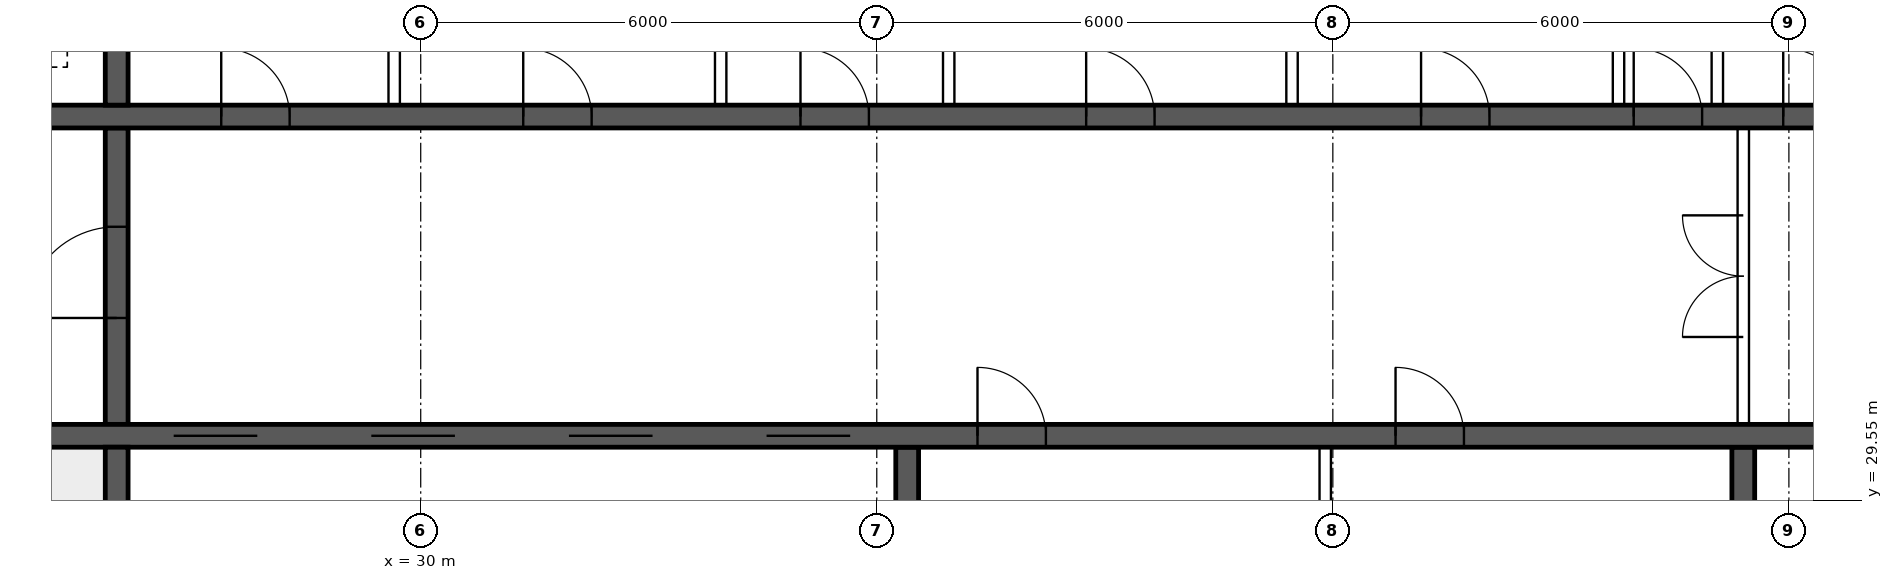
"""IFC4 building model, lengths in metres.
Left out: names, types, materials, properties, quantities, classifications, styles, units other than length and angle.
Written with IfcOpenShell. Run it as: python <this file> out.ifc"""

import sys

from ifc_helpers import new_model, si_unit, direction, frame, frame_2d, origin, place, context, subcontext, project, spatial, rectangle, extrude, element, fill, save


model = new_model("IFC4")
c1 = context("Model", 3, precision=1e-05, world=origin(), true_north=direction((0.0, 1.0)))
c2 = subcontext(c1, "Body", "Model", "MODEL_VIEW")
j1 = project(units=[si_unit("LENGTHUNIT", "METRE"), si_unit("PLANEANGLEUNIT", "RADIAN")], contexts=[c1])
p1 = place(None, origin())
s1 = spatial("IfcSite", under=j1, at=p1, CompositionType="ELEMENT")
p2 = place(p1, origin())
s2 = spatial("IfcBuilding", under=s1, at=p2, CompositionType="ELEMENT")
p3 = place(p2, frame((0.0, 0.0, 220.3)))
s3 = spatial("IfcBuildingStorey", under=s2, at=p3, CompositionType="ELEMENT", Elevation=220.3)
p4 = place(p3, frame((18.35, 30.4, 0.0), z_axis=(0.0, 0.0, 1.0), x_axis=(1.0, 0.0, 0.0)))
e1 = element("IfcWall", 1, at=p4, inside=s3, PredefinedType="SHEAR", context=c2, shape_type="SweptSolid", body=[
    extrude(rectangle(XDim=47.3, YDim=0.3, at=frame_2d((23.65, 0.0))), origin(), (0.0, 0.0, 1.0), 3.75),
])
p5 = place(p4, frame((0.4, 0.0, 0.0)))
e2 = element("IfcOpeningElement", 2, at=p5, cuts=e1, PredefinedType="OPENING", context=c2, shape_type="SweptSolid", body=[
    extrude(rectangle(XDim=1.0, YDim=2.1, at=frame_2d((0.5, 1.05))), frame((0.0, 0.16, 0.0), z_axis=(0.0, -1.0, 0.0), x_axis=(1.0, 0.0, 0.0)), (0.0, 0.0, 1.0), 0.32),
])
p6 = place(p4, frame((45.9, 0.0, 0.0)))
e3 = element("IfcOpeningElement", 3, at=p6, cuts=e1, PredefinedType="OPENING", context=c2, shape_type="SweptSolid", body=[
    extrude(rectangle(XDim=1.0, YDim=2.1, at=frame_2d((0.5, 1.05))), frame((0.0, 0.16, 0.0), z_axis=(0.0, -1.0, 0.0), x_axis=(1.0, 0.0, 0.0)), (0.0, 0.0, 1.0), 0.32),
])
p7 = place(p4, frame((8.4, 0.0, 0.0)))
e4 = element("IfcOpeningElement", 4, at=p7, cuts=e1, PredefinedType="OPENING", context=c2, shape_type="SweptSolid", body=[
    extrude(rectangle(XDim=1.1, YDim=2.1, at=frame_2d((0.55, 1.05))), frame((0.0, 0.16, 0.0), z_axis=(0.0, -1.0, 0.0), x_axis=(1.0, 0.0, 0.0)), (0.0, 0.0, 1.0), 0.32),
])
p8 = place(p4, frame((11.0, 0.0, 0.0)))
e5 = element("IfcOpeningElement", 5, at=p8, cuts=e1, PredefinedType="OPENING", context=c2, shape_type="SweptSolid", body=[
    extrude(rectangle(XDim=1.1, YDim=2.1, at=frame_2d((0.55, 1.05))), frame((0.0, 0.16, 0.0), z_axis=(0.0, -1.0, 0.0), x_axis=(1.0, 0.0, 0.0)), (0.0, 0.0, 1.0), 0.32),
])
p9 = place(p4, frame((13.6, 0.0, 0.0)))
e6 = element("IfcOpeningElement", 6, at=p9, cuts=e1, PredefinedType="OPENING", context=c2, shape_type="SweptSolid", body=[
    extrude(rectangle(XDim=1.1, YDim=2.1, at=frame_2d((0.55, 1.05))), frame((0.0, 0.16, 0.0), z_axis=(0.0, -1.0, 0.0), x_axis=(1.0, 0.0, 0.0)), (0.0, 0.0, 1.0), 0.32),
])
p10 = place(p4, frame((16.2, 0.0, 0.0)))
e7 = element("IfcOpeningElement", 7, at=p10, cuts=e1, PredefinedType="OPENING", context=c2, shape_type="SweptSolid", body=[
    extrude(rectangle(XDim=1.1, YDim=2.1, at=frame_2d((0.55, 1.05))), frame((0.0, 0.16, 0.0), z_axis=(0.0, -1.0, 0.0), x_axis=(1.0, 0.0, 0.0)), (0.0, 0.0, 1.0), 0.32),
])
p11 = place(p4, frame((18.975, 0.0, 0.0)))
e8 = element("IfcOpeningElement", 8, at=p11, cuts=e1, PredefinedType="OPENING", context=c2, shape_type="SweptSolid", body=[
    extrude(rectangle(XDim=0.9, YDim=2.1, at=frame_2d((0.45, 1.05))), frame((0.0, 0.16, 0.0), z_axis=(0.0, -1.0, 0.0), x_axis=(1.0, 0.0, 0.0)), (0.0, 0.0, 1.0), 0.32),
])
p12 = place(p4, frame((24.475, 0.0, 0.0)))
e9 = element("IfcOpeningElement", 9, at=p12, cuts=e1, PredefinedType="OPENING", context=c2, shape_type="SweptSolid", body=[
    extrude(rectangle(XDim=0.9, YDim=2.1, at=frame_2d((0.45, 1.05))), frame((0.0, 0.16, 0.0), z_axis=(0.0, -1.0, 0.0), x_axis=(1.0, 0.0, 0.0)), (0.0, 0.0, 1.0), 0.32),
])
p13 = place(p4, frame((30.267, 0.0, 0.0)))
e10 = element("IfcOpeningElement", 10, at=p13, cuts=e1, PredefinedType="OPENING", context=c2, shape_type="SweptSolid", body=[
    extrude(rectangle(XDim=1.1, YDim=2.1, at=frame_2d((0.55, 1.05))), frame((0.0, 0.16, 0.0), z_axis=(0.0, -1.0, 0.0), x_axis=(1.0, 0.0, 0.0)), (0.0, 0.0, 1.0), 0.32),
])
p14 = place(p4, frame((33.8, 0.0, 0.0)))
e11 = element("IfcOpeningElement", 11, at=p14, cuts=e1, PredefinedType="OPENING", context=c2, shape_type="SweptSolid", body=[
    extrude(rectangle(XDim=1.1, YDim=2.1, at=frame_2d((0.55, 1.05))), frame((0.0, 0.16, 0.0), z_axis=(0.0, -1.0, 0.0), x_axis=(1.0, 0.0, 0.0)), (0.0, 0.0, 1.0), 0.32),
])
p15 = place(p4, frame((37.333, 0.0, 0.0)))
e12 = element("IfcOpeningElement", 12, at=p15, cuts=e1, PredefinedType="OPENING", context=c2, shape_type="SweptSolid", body=[
    extrude(rectangle(XDim=1.1, YDim=2.1, at=frame_2d((0.55, 1.05))), frame((0.0, 0.16, 0.0), z_axis=(0.0, -1.0, 0.0), x_axis=(1.0, 0.0, 0.0)), (0.0, 0.0, 1.0), 0.32),
])
p16 = place(p3, frame((18.35, 34.6, 0.0), z_axis=(0.0, 0.0, 1.0), x_axis=(1.0, 0.0, 0.0)))
e13 = element("IfcWall", 13, at=p16, inside=s3, PredefinedType="SHEAR", context=c2, shape_type="SweptSolid", body=[
    extrude(rectangle(XDim=47.3, YDim=0.3, at=frame_2d((23.65, 0.0))), origin(), (0.0, 0.0, 1.0), 3.75),
])
p17 = place(p16, frame((0.9, 0.0, 0.0)))
e14 = element("IfcOpeningElement", 14, at=p17, cuts=e13, PredefinedType="OPENING", context=c2, shape_type="SweptSolid", body=[
    extrude(rectangle(XDim=1.1, YDim=2.1, at=frame_2d((0.55, 1.05))), frame((0.0, 0.16, 0.0), z_axis=(0.0, -1.0, 0.0), x_axis=(1.0, 0.0, 0.0)), (0.0, 0.0, 1.0), 0.32),
])
p18 = place(p16, frame((45.3, 0.0, 0.0)))
e15 = element("IfcOpeningElement", 15, at=p18, cuts=e13, PredefinedType="OPENING", context=c2, shape_type="SweptSolid", body=[
    extrude(rectangle(XDim=1.1, YDim=2.1, at=frame_2d((0.55, 1.05))), frame((0.0, 0.16, 0.0), z_axis=(0.0, -1.0, 0.0), x_axis=(1.0, 0.0, 0.0)), (0.0, 0.0, 1.0), 0.32),
])
p19 = place(p16, frame((4.25, 0.0, 0.0)))
e16 = element("IfcOpeningElement", 16, at=p19, cuts=e13, PredefinedType="OPENING", context=c2, shape_type="SweptSolid", body=[
    extrude(rectangle(XDim=0.9, YDim=2.1, at=frame_2d((0.45, 1.05))), frame((0.0, 0.16, 0.0), z_axis=(0.0, -1.0, 0.0), x_axis=(1.0, 0.0, 0.0)), (0.0, 0.0, 1.0), 0.32),
])
p20 = place(p16, frame((42.15, 0.0, 0.0)))
e17 = element("IfcOpeningElement", 17, at=p20, cuts=e13, PredefinedType="OPENING", context=c2, shape_type="SweptSolid", body=[
    extrude(rectangle(XDim=0.9, YDim=2.1, at=frame_2d((0.45, 1.05))), frame((0.0, 0.16, 0.0), z_axis=(0.0, -1.0, 0.0), x_axis=(1.0, 0.0, 0.0)), (0.0, 0.0, 1.0), 0.32),
])
p21 = place(p16, frame((9.025, 0.0, 0.0)))
e18 = element("IfcOpeningElement", 18, at=p21, cuts=e13, PredefinedType="OPENING", context=c2, shape_type="SweptSolid", body=[
    extrude(rectangle(XDim=0.9, YDim=2.1, at=frame_2d((0.45, 1.05))), frame((0.0, 0.16, 0.0), z_axis=(0.0, -1.0, 0.0), x_axis=(1.0, 0.0, 0.0)), (0.0, 0.0, 1.0), 0.32),
])
p22 = place(p16, frame((12.999, 0.0, 0.0)))
e19 = element("IfcOpeningElement", 19, at=p22, cuts=e13, PredefinedType="OPENING", context=c2, shape_type="SweptSolid", body=[
    extrude(rectangle(XDim=0.9, YDim=2.1, at=frame_2d((0.45, 1.05))), frame((0.0, 0.16, 0.0), z_axis=(0.0, -1.0, 0.0), x_axis=(1.0, 0.0, 0.0)), (0.0, 0.0, 1.0), 0.32),
])
p23 = place(p16, frame((16.646, 0.0, 0.0)))
e20 = element("IfcOpeningElement", 20, at=p23, cuts=e13, PredefinedType="OPENING", context=c2, shape_type="SweptSolid", body=[
    extrude(rectangle(XDim=0.9, YDim=2.1, at=frame_2d((0.45, 1.05))), frame((0.0, 0.16, 0.0), z_axis=(0.0, -1.0, 0.0), x_axis=(1.0, 0.0, 0.0)), (0.0, 0.0, 1.0), 0.32),
])
p24 = place(p16, frame((20.405, 0.0, 0.0)))
e21 = element("IfcOpeningElement", 21, at=p24, cuts=e13, PredefinedType="OPENING", context=c2, shape_type="SweptSolid", body=[
    extrude(rectangle(XDim=0.9, YDim=2.1, at=frame_2d((0.45, 1.05))), frame((0.0, 0.16, 0.0), z_axis=(0.0, -1.0, 0.0), x_axis=(1.0, 0.0, 0.0)), (0.0, 0.0, 1.0), 0.32),
])
p25 = place(p16, frame((24.811, 0.0, 0.0)))
e22 = element("IfcOpeningElement", 22, at=p25, cuts=e13, PredefinedType="OPENING", context=c2, shape_type="SweptSolid", body=[
    extrude(rectangle(XDim=0.9, YDim=2.1, at=frame_2d((0.45, 1.05))), frame((0.0, 0.16, 0.0), z_axis=(0.0, -1.0, 0.0), x_axis=(1.0, 0.0, 0.0)), (0.0, 0.0, 1.0), 0.32),
])
p26 = place(p16, frame((27.608, 0.0, 0.0)))
e23 = element("IfcOpeningElement", 23, at=p26, cuts=e13, PredefinedType="OPENING", context=c2, shape_type="SweptSolid", body=[
    extrude(rectangle(XDim=0.9, YDim=2.1, at=frame_2d((0.45, 1.05))), frame((0.0, 0.16, 0.0), z_axis=(0.0, -1.0, 0.0), x_axis=(1.0, 0.0, 0.0)), (0.0, 0.0, 1.0), 0.32),
])
p27 = place(p16, frame((29.575, 0.0, 0.0)))
e24 = element("IfcOpeningElement", 24, at=p27, cuts=e13, PredefinedType="OPENING", context=c2, shape_type="SweptSolid", body=[
    extrude(rectangle(XDim=0.9, YDim=2.1, at=frame_2d((0.45, 1.05))), frame((0.0, 0.16, 0.0), z_axis=(0.0, -1.0, 0.0), x_axis=(1.0, 0.0, 0.0)), (0.0, 0.0, 1.0), 0.32),
])
p28 = place(p16, frame((32.007, 0.0, 0.0)))
e25 = element("IfcOpeningElement", 25, at=p28, cuts=e13, PredefinedType="OPENING", context=c2, shape_type="SweptSolid", body=[
    extrude(rectangle(XDim=0.9, YDim=2.1, at=frame_2d((0.45, 1.05))), frame((0.0, 0.16, 0.0), z_axis=(0.0, -1.0, 0.0), x_axis=(1.0, 0.0, 0.0)), (0.0, 0.0, 1.0), 0.32),
])
p29 = place(p16, frame((34.742, 0.0, 0.0)))
e26 = element("IfcOpeningElement", 26, at=p29, cuts=e13, PredefinedType="OPENING", context=c2, shape_type="SweptSolid", body=[
    extrude(rectangle(XDim=0.9, YDim=2.1, at=frame_2d((0.45, 1.05))), frame((0.0, 0.16, 0.0), z_axis=(0.0, -1.0, 0.0), x_axis=(1.0, 0.0, 0.0)), (0.0, 0.0, 1.0), 0.32),
])
p30 = place(p16, frame((37.781, 0.0, 0.0)))
e27 = element("IfcOpeningElement", 27, at=p30, cuts=e13, PredefinedType="OPENING", context=c2, shape_type="SweptSolid", body=[
    extrude(rectangle(XDim=0.9, YDim=2.1, at=frame_2d((0.45, 1.05))), frame((0.0, 0.16, 0.0), z_axis=(0.0, -1.0, 0.0), x_axis=(1.0, 0.0, 0.0)), (0.0, 0.0, 1.0), 0.32),
])
p31 = place(p3, frame((26.0, 26.15, 0.0), z_axis=(0.0, 0.0, 1.0), x_axis=(0.0, 1.0, 0.0)))
e28 = element("IfcWall", 28, at=p31, inside=s3, PredefinedType="SHEAR", context=c2, shape_type="SweptSolid", body=[
    extrude(rectangle(XDim=4.1, YDim=0.3, at=frame_2d((2.05, 0.0))), origin(), (0.0, 0.0, 1.0), 3.75),
])
p32 = place(p3, frame((26.0, 30.55, 0.0), z_axis=(0.0, 0.0, 1.0), x_axis=(0.0, 1.0, 0.0)))
e29 = element("IfcWall", 29, at=p32, inside=s3, PredefinedType="SHEAR", context=c2, shape_type="SweptSolid", body=[
    extrude(rectangle(XDim=3.9, YDim=0.3, at=frame_2d((1.95, 0.0))), origin(), (0.0, 0.0, 1.0), 3.75),
])
p33 = place(p32, frame((1.4, 0.0, 0.0)))
e30 = element("IfcOpeningElement", 30, at=p33, cuts=e29, PredefinedType="OPENING", context=c2, shape_type="SweptSolid", body=[
    extrude(rectangle(XDim=1.2, YDim=2.1, at=frame_2d((0.6, 1.05))), frame((0.0, 0.16, 0.0), z_axis=(0.0, -1.0, 0.0), x_axis=(1.0, 0.0, 0.0)), (0.0, 0.0, 1.0), 0.32),
])
p34 = place(p3, frame((26.0, 34.75, 0.0), z_axis=(0.0, 0.0, 1.0), x_axis=(0.0, 1.0, 0.0)))
e31 = element("IfcWall", 31, at=p34, inside=s3, PredefinedType="SHEAR", context=c2, shape_type="SweptSolid", body=[
    extrude(rectangle(XDim=3.1, YDim=0.3, at=frame_2d((1.55, 0.0))), origin(), (0.0, 0.0, 1.0), 3.75),
])
for number, where, z_axis, x_axis in (
    (32, (36.4, 26.15, 0.0), (0.0, 0.0, 1.0), (0.0, 1.0, 0.0)),
    (33, (47.4, 26.15, 0.0), (0.0, 0.0, 1.0), (0.0, 1.0, 0.0)),
):
    element("IfcWall", number, at=place(p3, frame(where, z_axis=z_axis, x_axis=x_axis)), inside=s3, PredefinedType="SHEAR", context=c2, shape_type="SweptSolid", body=[
        extrude(rectangle(XDim=4.1, YDim=0.3, at=frame_2d((2.05, 0.0))), origin(), (0.0, 0.0, 1.0), 3.75),
    ])
p35 = place(p3, frame((47.4, 30.55, 0.0), z_axis=(0.0, 0.0, 1.0), x_axis=(0.0, 1.0, 0.0)))
e34 = element("IfcWall", 34, at=p35, inside=s3, PredefinedType="SOLIDWALL", context=c2, shape_type="SweptSolid", body=[
    extrude(rectangle(XDim=3.9, YDim=0.15, at=frame_2d((1.95, 0.0))), origin(), (0.0, 0.0, 1.0), 3.5),
])
p36 = place(p35, frame((1.15, 0.0, 0.0)))
e35 = element("IfcOpeningElement", 35, at=p36, cuts=e34, PredefinedType="OPENING", context=c2, shape_type="SweptSolid", body=[
    extrude(rectangle(XDim=1.6, YDim=2.1, at=frame_2d((0.8, 1.05))), frame((0.0, 0.085, 0.0), z_axis=(0.0, -1.0, 0.0), x_axis=(1.0, 0.0, 0.0)), (0.0, 0.0, 1.0), 0.17),
])
for number, where, z_axis, x_axis in (
    (36, (29.651, 34.75, 0.0), (0.0, 0.0, 1.0), (0.0, 1.0, 0.0)),
    (37, (33.946, 34.75, 0.0), (0.0, 0.0, 1.0), (0.0, 1.0, 0.0)),
    (38, (36.946, 34.75, 0.0), (0.0, 0.0, 1.0), (0.0, 1.0, 0.0)),
    (39, (41.463, 34.75, 0.0), (0.0, 0.0, 1.0), (0.0, 1.0, 0.0)),
    (40, (45.758, 34.75, 0.0), (0.0, 0.0, 1.0), (0.0, 1.0, 0.0)),
    (41, (47.058, 34.75, 0.0), (0.0, 0.0, 1.0), (0.0, 1.0, 0.0)),
):
    element("IfcWall", number, at=place(p3, frame(where, z_axis=z_axis, x_axis=x_axis)), inside=s3, PredefinedType="SOLIDWALL", context=c2, shape_type="SweptSolid", body=[
        extrude(rectangle(XDim=3.1, YDim=0.15, at=frame_2d((1.55, 0.0))), origin(), (0.0, 0.0, 1.0), 3.5),
    ])
p37 = place(p3, frame((41.9, 26.15, 0.0), z_axis=(0.0, 0.0, 1.0), x_axis=(0.0, 1.0, 0.0)))
e42 = element("IfcWall", 42, at=p37, inside=s3, PredefinedType="SOLIDWALL", context=c2, shape_type="SweptSolid", body=[
    extrude(rectangle(XDim=4.1, YDim=0.15, at=frame_2d((2.05, 0.0))), origin(), (0.0, 0.0, 1.0), 3.5),
])
p38 = place(p36, origin())
e43 = element("IfcDoor", 43, at=p38, inside=s3, OperationType="DOUBLE_DOOR_SINGLE_SWING", PredefinedType="DOOR", context=c2, shape_type="SweptSolid", body=[
    extrude(rectangle(XDim=1.6, YDim=2.1, at=frame_2d((0.8, 1.05))), frame((0.0, 0.025, 0.0), z_axis=(0.0, -1.0, 0.0), x_axis=(1.0, 0.0, 0.0)), (0.0, 0.0, 1.0), 0.05),
])
fill(e35, e43)
p39 = place(p33, origin())
e44 = element("IfcDoor", 44, at=p39, inside=s3, OperationType="SINGLE_SWING_LEFT", PredefinedType="DOOR", context=c2, shape_type="SweptSolid", body=[
    extrude(rectangle(XDim=1.2, YDim=2.1, at=frame_2d((0.6, 1.05))), frame((0.0, 0.025, 0.0), z_axis=(0.0, -1.0, 0.0), x_axis=(1.0, 0.0, 0.0)), (0.0, 0.0, 1.0), 0.05),
])
fill(e30, e44)
p40 = place(p21, origin())
e45 = element("IfcDoor", 45, at=p40, inside=s3, OperationType="SINGLE_SWING_LEFT", PredefinedType="DOOR", context=c2, shape_type="SweptSolid", body=[
    extrude(rectangle(XDim=0.9, YDim=2.1, at=frame_2d((0.45, 1.05))), frame((0.0, 0.025, 0.0), z_axis=(0.0, -1.0, 0.0), x_axis=(1.0, 0.0, 0.0)), (0.0, 0.0, 1.0), 0.05),
])
fill(e18, e45)
p41 = place(p22, origin())
e46 = element("IfcDoor", 46, at=p41, inside=s3, OperationType="SINGLE_SWING_LEFT", PredefinedType="DOOR", context=c2, shape_type="SweptSolid", body=[
    extrude(rectangle(XDim=0.9, YDim=2.1, at=frame_2d((0.45, 1.05))), frame((0.0, 0.025, 0.0), z_axis=(0.0, -1.0, 0.0), x_axis=(1.0, 0.0, 0.0)), (0.0, 0.0, 1.0), 0.05),
])
fill(e19, e46)
p42 = place(p23, origin())
e47 = element("IfcDoor", 47, at=p42, inside=s3, OperationType="SINGLE_SWING_LEFT", PredefinedType="DOOR", context=c2, shape_type="SweptSolid", body=[
    extrude(rectangle(XDim=0.9, YDim=2.1, at=frame_2d((0.45, 1.05))), frame((0.0, 0.025, 0.0), z_axis=(0.0, -1.0, 0.0), x_axis=(1.0, 0.0, 0.0)), (0.0, 0.0, 1.0), 0.05),
])
fill(e20, e47)
p43 = place(p24, origin())
e48 = element("IfcDoor", 48, at=p43, inside=s3, OperationType="SINGLE_SWING_LEFT", PredefinedType="DOOR", context=c2, shape_type="SweptSolid", body=[
    extrude(rectangle(XDim=0.9, YDim=2.1, at=frame_2d((0.45, 1.05))), frame((0.0, 0.025, 0.0), z_axis=(0.0, -1.0, 0.0), x_axis=(1.0, 0.0, 0.0)), (0.0, 0.0, 1.0), 0.05),
])
fill(e21, e48)
p44 = place(p25, origin())
e49 = element("IfcDoor", 49, at=p44, inside=s3, OperationType="SINGLE_SWING_LEFT", PredefinedType="DOOR", context=c2, shape_type="SweptSolid", body=[
    extrude(rectangle(XDim=0.9, YDim=2.1, at=frame_2d((0.45, 1.05))), frame((0.0, 0.025, 0.0), z_axis=(0.0, -1.0, 0.0), x_axis=(1.0, 0.0, 0.0)), (0.0, 0.0, 1.0), 0.05),
])
fill(e22, e49)
p45 = place(p26, origin())
e50 = element("IfcDoor", 50, at=p45, inside=s3, OperationType="SINGLE_SWING_LEFT", PredefinedType="DOOR", context=c2, shape_type="SweptSolid", body=[
    extrude(rectangle(XDim=0.9, YDim=2.1, at=frame_2d((0.45, 1.05))), frame((0.0, 0.025, 0.0), z_axis=(0.0, -1.0, 0.0), x_axis=(1.0, 0.0, 0.0)), (0.0, 0.0, 1.0), 0.05),
])
fill(e23, e50)
p46 = place(p27, origin())
e51 = element("IfcDoor", 51, at=p46, inside=s3, OperationType="SINGLE_SWING_LEFT", PredefinedType="DOOR", context=c2, shape_type="SweptSolid", body=[
    extrude(rectangle(XDim=0.9, YDim=2.1, at=frame_2d((0.45, 1.05))), frame((0.0, 0.025, 0.0), z_axis=(0.0, -1.0, 0.0), x_axis=(1.0, 0.0, 0.0)), (0.0, 0.0, 1.0), 0.05),
])
fill(e24, e51)
p47 = place(p7, origin())
e52 = element("IfcDoor", 52, at=p47, inside=s3, OperationType="DOUBLE_DOOR_SLIDING", PredefinedType="DOOR", context=c2, shape_type="SweptSolid", body=[
    extrude(rectangle(XDim=1.1, YDim=2.1, at=frame_2d((0.55, 1.05))), frame((0.0, 0.025, 0.0), z_axis=(0.0, -1.0, 0.0), x_axis=(1.0, 0.0, 0.0)), (0.0, 0.0, 1.0), 0.05),
])
fill(e4, e52)
p48 = place(p8, origin())
e53 = element("IfcDoor", 53, at=p48, inside=s3, OperationType="DOUBLE_DOOR_SLIDING", PredefinedType="DOOR", context=c2, shape_type="SweptSolid", body=[
    extrude(rectangle(XDim=1.1, YDim=2.1, at=frame_2d((0.55, 1.05))), frame((0.0, 0.025, 0.0), z_axis=(0.0, -1.0, 0.0), x_axis=(1.0, 0.0, 0.0)), (0.0, 0.0, 1.0), 0.05),
])
fill(e5, e53)
p49 = place(p9, origin())
e54 = element("IfcDoor", 54, at=p49, inside=s3, OperationType="DOUBLE_DOOR_SLIDING", PredefinedType="DOOR", context=c2, shape_type="SweptSolid", body=[
    extrude(rectangle(XDim=1.1, YDim=2.1, at=frame_2d((0.55, 1.05))), frame((0.0, 0.025, 0.0), z_axis=(0.0, -1.0, 0.0), x_axis=(1.0, 0.0, 0.0)), (0.0, 0.0, 1.0), 0.05),
])
fill(e6, e54)
p50 = place(p10, origin())
e55 = element("IfcDoor", 55, at=p50, inside=s3, OperationType="DOUBLE_DOOR_SLIDING", PredefinedType="DOOR", context=c2, shape_type="SweptSolid", body=[
    extrude(rectangle(XDim=1.1, YDim=2.1, at=frame_2d((0.55, 1.05))), frame((0.0, 0.025, 0.0), z_axis=(0.0, -1.0, 0.0), x_axis=(1.0, 0.0, 0.0)), (0.0, 0.0, 1.0), 0.05),
])
fill(e7, e55)
p51 = place(p11, origin())
e56 = element("IfcDoor", 56, at=p51, inside=s3, OperationType="SINGLE_SWING_LEFT", PredefinedType="DOOR", context=c2, shape_type="SweptSolid", body=[
    extrude(rectangle(XDim=0.9, YDim=2.1, at=frame_2d((0.45, 1.05))), frame((0.0, 0.025, 0.0), z_axis=(0.0, -1.0, 0.0), x_axis=(1.0, 0.0, 0.0)), (0.0, 0.0, 1.0), 0.05),
])
fill(e8, e56)
p52 = place(p12, origin())
e57 = element("IfcDoor", 57, at=p52, inside=s3, OperationType="SINGLE_SWING_LEFT", PredefinedType="DOOR", context=c2, shape_type="SweptSolid", body=[
    extrude(rectangle(XDim=0.9, YDim=2.1, at=frame_2d((0.45, 1.05))), frame((0.0, 0.025, 0.0), z_axis=(0.0, -1.0, 0.0), x_axis=(1.0, 0.0, 0.0)), (0.0, 0.0, 1.0), 0.05),
])
fill(e9, e57)
save(model, sys.argv[1])
